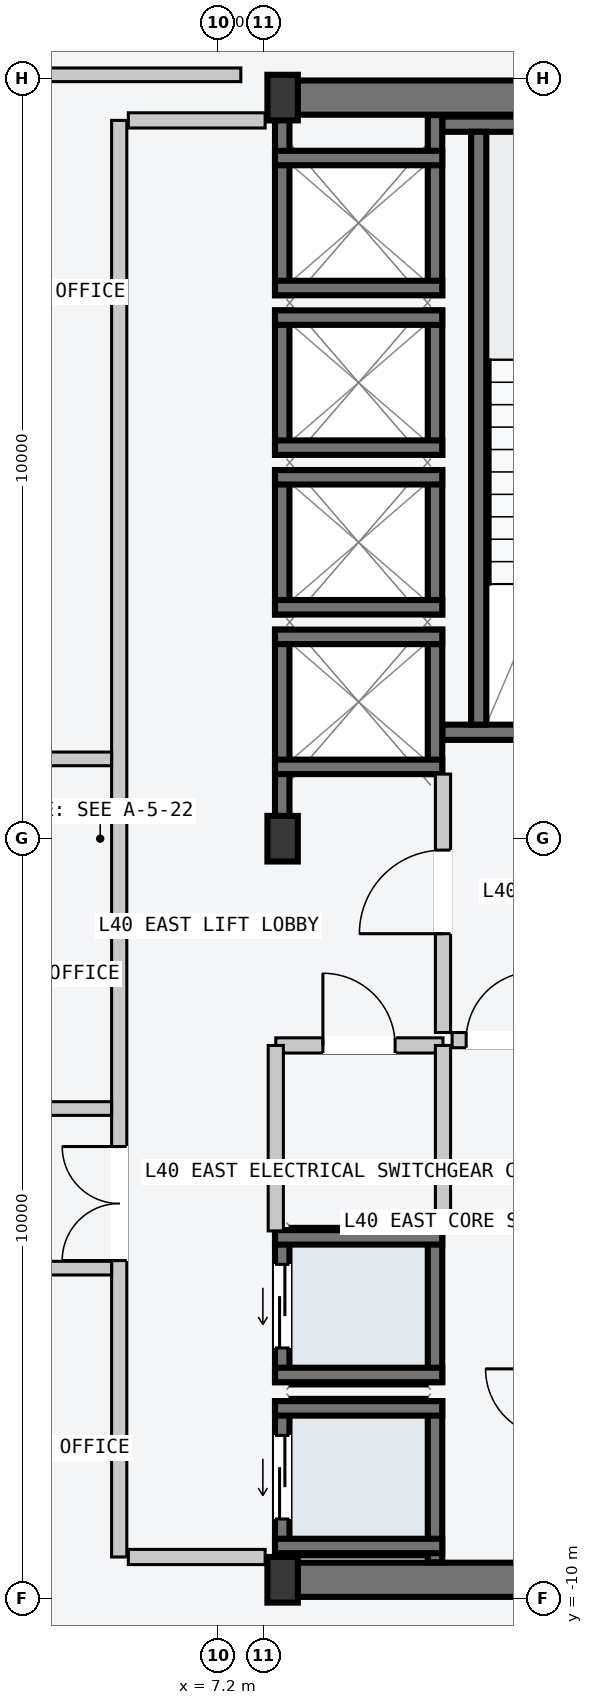
"""IFC4 building model, lengths in metres.
Left out: names, types, materials, properties, quantities, classifications, styles, units other than length and angle.
Written with IfcOpenShell. Run it as: python <this file> out.ifc"""

import sys

from ifc_helpers import new_model, si_unit, direction, frame, frame_2d, origin, origin_2d, place, context, subcontext, project, spatial, rectangle, i_section, extrude, element, fill, save


model = new_model("IFC4")
c1 = context("Model", 3, precision=1e-05, world=origin(), true_north=direction((0.0, 1.0)))
c2 = subcontext(c1, "Body", "Model", "MODEL_VIEW")
j1 = project(units=[si_unit("LENGTHUNIT", "METRE"), si_unit("PLANEANGLEUNIT", "RADIAN")], contexts=[c1])
p1 = place(None, origin())
s1 = spatial("IfcSite", under=j1, at=p1, CompositionType="ELEMENT")
p2 = place(p1, origin())
s2 = spatial("IfcBuilding", under=s1, at=p2, CompositionType="ELEMENT")
p3 = place(p2, frame((0.0, 0.0, 155.1)))
s3 = spatial("IfcBuildingStorey", under=s2, at=p3, CompositionType="ELEMENT", Elevation=155.1)
for number, where, z_axis, x_axis in (
    (1, (8.07, -9.75, -0.2), (0.0, 0.0, 1.0), (1.0, 0.0, 0.0)),
    (2, (8.07, 9.75, -0.2), (0.0, 0.0, 1.0), (1.0, 0.0, 0.0)),
):
    element("IfcWall", number, at=place(p3, frame(where, z_axis=z_axis, x_axis=x_axis)), inside=s3, PredefinedType="SHEAR", context=c2, shape_type="SweptSolid", body=[
        extrude(rectangle(XDim=6.46, YDim=0.45, at=frame_2d((3.23, 0.0))), origin(), (0.0, 0.0, 1.0), 3.6),
    ])
p4 = place(p3, frame((10.15, 1.4, -0.2), z_axis=(0.0, 0.0, 1.0), x_axis=(1.0, 0.0, 0.0)))
e3 = element("IfcWall", 3, at=p4, inside=s3, PredefinedType="SOLIDWALL", context=c2, shape_type="SweptSolid", body=[
    extrude(rectangle(XDim=4.1, YDim=0.2, at=frame_2d((2.05, 0.0))), origin(), (0.0, 0.0, 1.0), 3.6),
])
p5 = place(p4, frame((1.5, 0.0, 0.2)))
e4 = element("IfcOpeningElement", 4, at=p5, cuts=e3, PredefinedType="OPENING", context=c2, shape_type="SweptSolid", body=[
    extrude(rectangle(XDim=1.12, YDim=2.18, at=frame_2d((0.56, 1.09))), frame((0.0, 0.11, 0.0), z_axis=(0.0, -1.0, 0.0), x_axis=(1.0, 0.0, 0.0)), (0.0, 0.0, 1.0), 0.22),
])
p6 = place(p3, frame((10.15, 9.4, -0.2), z_axis=(0.0, 0.0, 1.0), x_axis=(1.0, 0.0, 0.0)))
e5 = element("IfcWall", 5, at=p6, inside=s3, PredefinedType="SOLIDWALL", context=c2, shape_type="SweptSolid", body=[
    extrude(rectangle(XDim=4.1, YDim=0.2, at=frame_2d((2.05, 0.0))), origin(), (0.0, 0.0, 1.0), 3.6),
])
p7 = place(p3, frame((10.63, 1.5, -0.2), z_axis=(0.0, 0.0, 1.0), x_axis=(0.0, 1.0, 0.0)))
e6 = element("IfcWall", 6, at=p7, inside=s3, PredefinedType="SOLIDWALL", context=c2, shape_type="SweptSolid", body=[
    extrude(rectangle(XDim=7.8, YDim=0.2, at=frame_2d((3.9, 0.0))), origin(), (0.0, 0.0, 1.0), 3.6),
])
for number, where, z_axis, x_axis in (
    (7, (8.05, -9.75, 0.0), (0.0, 0.0, 1.0), (1.0, 0.0, 0.0)),
    (8, (8.05, 0.0, 0.0), (0.0, 0.0, 1.0), (1.0, 0.0, 0.0)),
    (9, (8.05, 9.75, 0.0), (0.0, 0.0, 1.0), (1.0, 0.0, 0.0)),
):
    element("IfcColumn", number, at=place(p3, frame(where, z_axis=z_axis, x_axis=x_axis)), inside=s3, PredefinedType="COLUMN", context=c2, shape_type="SweptSolid", body=[
        extrude(i_section(OverallWidth=0.4, OverallDepth=0.6, WebThickness=0.022, FlangeThickness=0.036, at=origin_2d()), origin(), (0.0, 0.0, 1.0), 3.6),
    ])
p8 = place(p3, frame((8.045, 0.21, -0.2), z_axis=(0.0, 0.0, 1.0), x_axis=(0.0, 1.0, 0.0)))
e10 = element("IfcWall", 10, at=p8, inside=s3, PredefinedType="SOLIDWALL", context=c2, shape_type="SweptSolid", body=[
    extrude(rectangle(XDim=2.54, YDim=0.19, at=frame_2d((1.27, 0.0))), origin(), (0.0, 0.0, 1.0), 3.6),
])
p9 = place(p3, frame((10.055, 0.85, -0.2), z_axis=(0.0, 0.0, 1.0), x_axis=(0.0, 1.0, 0.0)))
e11 = element("IfcWall", 11, at=p9, inside=s3, PredefinedType="SOLIDWALL", context=c2, shape_type="SweptSolid", body=[
    extrude(rectangle(XDim=1.9, YDim=0.19, at=frame_2d((0.95, 0.0))), origin(), (0.0, 0.0, 1.0), 3.6),
])
for number, where, z_axis, x_axis in (
    (12, (7.95, 2.655, -0.2), (0.0, 0.0, 1.0), (1.0, 0.0, 0.0)),
    (13, (7.95, 0.945, -0.2), (0.0, 0.0, 1.0), (1.0, 0.0, 0.0)),
):
    element("IfcWall", number, at=place(p3, frame(where, z_axis=z_axis, x_axis=x_axis)), inside=s3, PredefinedType="SOLIDWALL", context=c2, shape_type="SweptSolid", body=[
        extrude(rectangle(XDim=2.2, YDim=0.19, at=frame_2d((1.1, 0.0))), origin(), (0.0, 0.0, 1.0), 3.6),
    ])
for number, where, z_axis, x_axis in (
    (14, (8.045, 2.95, -0.2), (0.0, 0.0, 1.0), (0.0, 1.0, 0.0)),
    (15, (10.055, 2.95, -0.2), (0.0, 0.0, 1.0), (0.0, 1.0, 0.0)),
):
    element("IfcWall", number, at=place(p3, frame(where, z_axis=z_axis, x_axis=x_axis)), inside=s3, PredefinedType="SOLIDWALL", context=c2, shape_type="SweptSolid", body=[
        extrude(rectangle(XDim=1.9, YDim=0.19, at=frame_2d((0.95, 0.0))), origin(), (0.0, 0.0, 1.0), 3.6),
    ])
for number, where, z_axis, x_axis in (
    (16, (7.95, 4.755, -0.2), (0.0, 0.0, 1.0), (1.0, 0.0, 0.0)),
    (17, (7.95, 3.045, -0.2), (0.0, 0.0, 1.0), (1.0, 0.0, 0.0)),
):
    element("IfcWall", number, at=place(p3, frame(where, z_axis=z_axis, x_axis=x_axis)), inside=s3, PredefinedType="SOLIDWALL", context=c2, shape_type="SweptSolid", body=[
        extrude(rectangle(XDim=2.2, YDim=0.19, at=frame_2d((1.1, 0.0))), origin(), (0.0, 0.0, 1.0), 3.6),
    ])
for number, where, z_axis, x_axis in (
    (18, (8.045, 5.05, -0.2), (0.0, 0.0, 1.0), (0.0, 1.0, 0.0)),
    (19, (10.055, 5.05, -0.2), (0.0, 0.0, 1.0), (0.0, 1.0, 0.0)),
):
    element("IfcWall", number, at=place(p3, frame(where, z_axis=z_axis, x_axis=x_axis)), inside=s3, PredefinedType="SOLIDWALL", context=c2, shape_type="SweptSolid", body=[
        extrude(rectangle(XDim=1.9, YDim=0.19, at=frame_2d((0.95, 0.0))), origin(), (0.0, 0.0, 1.0), 3.6),
    ])
for number, where, z_axis, x_axis in (
    (20, (7.95, 6.855, -0.2), (0.0, 0.0, 1.0), (1.0, 0.0, 0.0)),
    (21, (7.95, 5.145, -0.2), (0.0, 0.0, 1.0), (1.0, 0.0, 0.0)),
):
    element("IfcWall", number, at=place(p3, frame(where, z_axis=z_axis, x_axis=x_axis)), inside=s3, PredefinedType="SOLIDWALL", context=c2, shape_type="SweptSolid", body=[
        extrude(rectangle(XDim=2.2, YDim=0.19, at=frame_2d((1.1, 0.0))), origin(), (0.0, 0.0, 1.0), 3.6),
    ])
for number, where, z_axis, x_axis in (
    (22, (8.045, 7.15, -0.2), (0.0, 0.0, 1.0), (0.0, 1.0, 0.0)),
    (23, (10.055, 7.15, -0.2), (0.0, 0.0, 1.0), (0.0, 1.0, 0.0)),
):
    element("IfcWall", number, at=place(p3, frame(where, z_axis=z_axis, x_axis=x_axis)), inside=s3, PredefinedType="SOLIDWALL", context=c2, shape_type="SweptSolid", body=[
        extrude(rectangle(XDim=2.37, YDim=0.19, at=frame_2d((1.185, 0.0))), origin(), (0.0, 0.0, 1.0), 3.6),
    ])
for number, where, z_axis, x_axis in (
    (24, (7.95, 8.955, -0.2), (0.0, 0.0, 1.0), (1.0, 0.0, 0.0)),
    (25, (7.95, 7.245, -0.2), (0.0, 0.0, 1.0), (1.0, 0.0, 0.0)),
):
    element("IfcWall", number, at=place(p3, frame(where, z_axis=z_axis, x_axis=x_axis)), inside=s3, PredefinedType="SOLIDWALL", context=c2, shape_type="SweptSolid", body=[
        extrude(rectangle(XDim=2.2, YDim=0.19, at=frame_2d((1.1, 0.0))), origin(), (0.0, 0.0, 1.0), 3.6),
    ])
p10 = place(p3, frame((8.045, -9.52, -0.2), z_axis=(0.0, 0.0, 1.0), x_axis=(0.0, 1.0, 0.0)))
e26 = element("IfcWall", 26, at=p10, inside=s3, PredefinedType="SOLIDWALL", context=c2, shape_type="SweptSolid", body=[
    extrude(rectangle(XDim=2.12, YDim=0.19, at=frame_2d((1.06, 0.0))), origin(), (0.0, 0.0, 1.0), 3.6),
])
p11 = place(p10, frame((0.57, 0.0, 0.2)))
e27 = element("IfcOpeningElement", 27, at=p11, cuts=e26, PredefinedType="OPENING", context=c2, shape_type="SweptSolid", body=[
    extrude(rectangle(XDim=1.1, YDim=2.2, at=frame_2d((0.55, 1.1))), frame((0.0, 0.105, 0.0), z_axis=(0.0, -1.0, 0.0), x_axis=(1.0, 0.0, 0.0)), (0.0, 0.0, 1.0), 0.21),
])
p12 = place(p3, frame((10.055, -9.52, -0.2), z_axis=(0.0, 0.0, 1.0), x_axis=(0.0, 1.0, 0.0)))
e28 = element("IfcWall", 28, at=p12, inside=s3, PredefinedType="SOLIDWALL", context=c2, shape_type="SweptSolid", body=[
    extrude(rectangle(XDim=2.12, YDim=0.19, at=frame_2d((1.06, 0.0))), origin(), (0.0, 0.0, 1.0), 3.6),
])
for number, where, z_axis, x_axis in (
    (29, (7.95, -7.495, -0.2), (0.0, 0.0, 1.0), (1.0, 0.0, 0.0)),
    (30, (7.95, -9.305, -0.2), (0.0, 0.0, 1.0), (1.0, 0.0, 0.0)),
):
    element("IfcWall", number, at=place(p3, frame(where, z_axis=z_axis, x_axis=x_axis)), inside=s3, PredefinedType="SOLIDWALL", context=c2, shape_type="SweptSolid", body=[
        extrude(rectangle(XDim=2.2, YDim=0.19, at=frame_2d((1.1, 0.0))), origin(), (0.0, 0.0, 1.0), 3.6),
    ])
p13 = place(p3, frame((8.045, -7.15, -0.2), z_axis=(0.0, 0.0, 1.0), x_axis=(0.0, 1.0, 0.0)))
e31 = element("IfcWall", 31, at=p13, inside=s3, PredefinedType="SOLIDWALL", context=c2, shape_type="SweptSolid", body=[
    extrude(rectangle(XDim=2.0, YDim=0.19, at=frame_2d((1.0, 0.0))), origin(), (0.0, 0.0, 1.0), 3.6),
])
p14 = place(p13, frame((0.45, 0.0, 0.2)))
e32 = element("IfcOpeningElement", 32, at=p14, cuts=e31, PredefinedType="OPENING", context=c2, shape_type="SweptSolid", body=[
    extrude(rectangle(XDim=1.1, YDim=2.2, at=frame_2d((0.55, 1.1))), frame((0.0, 0.105, 0.0), z_axis=(0.0, -1.0, 0.0), x_axis=(1.0, 0.0, 0.0)), (0.0, 0.0, 1.0), 0.21),
])
p15 = place(p3, frame((10.055, -7.15, -0.2), z_axis=(0.0, 0.0, 1.0), x_axis=(0.0, 1.0, 0.0)))
e33 = element("IfcWall", 33, at=p15, inside=s3, PredefinedType="SOLIDWALL", context=c2, shape_type="SweptSolid", body=[
    extrude(rectangle(XDim=2.0, YDim=0.19, at=frame_2d((1.0, 0.0))), origin(), (0.0, 0.0, 1.0), 3.6),
])
for number, where, z_axis, x_axis in (
    (34, (7.95, -5.245, -0.2), (0.0, 0.0, 1.0), (1.0, 0.0, 0.0)),
    (35, (7.95, -7.055, -0.2), (0.0, 0.0, 1.0), (1.0, 0.0, 0.0)),
):
    element("IfcWall", number, at=place(p3, frame(where, z_axis=z_axis, x_axis=x_axis)), inside=s3, PredefinedType="SOLIDWALL", context=c2, shape_type="SweptSolid", body=[
        extrude(rectangle(XDim=2.2, YDim=0.19, at=frame_2d((1.1, 0.0))), origin(), (0.0, 0.0, 1.0), 3.6),
    ])
p16 = place(p3, frame((5.9, -9.45, 0.0), z_axis=(0.0, 0.0, 1.0), x_axis=(0.0, 1.0, 0.0)))
e36 = element("IfcWall", 36, at=p16, inside=s3, PredefinedType="PARTITIONING", context=c2, shape_type="SweptSolid", body=[
    extrude(rectangle(XDim=18.9, YDim=0.2, at=frame_2d((9.45, 0.0))), origin(), (0.0, 0.0, 1.0), 3.4),
])
p17 = place(p16, frame((3.9, 0.0, 0.0)))
e37 = element("IfcOpeningElement", 37, at=p17, cuts=e36, PredefinedType="OPENING", context=c2, shape_type="SweptSolid", body=[
    extrude(rectangle(XDim=1.5, YDim=2.2, at=frame_2d((0.75, 1.1))), frame((0.0, 0.11, 0.0), z_axis=(0.0, -1.0, 0.0), x_axis=(1.0, 0.0, 0.0)), (0.0, 0.0, 1.0), 0.22),
])
for number, where, z_axis, x_axis in (
    (38, (6.02, -9.45, 0.0), (0.0, 0.0, 1.0), (1.0, 0.0, 0.0)),
    (39, (6.02, 9.45, 0.0), (0.0, 0.0, 1.0), (1.0, 0.0, 0.0)),
):
    element("IfcWall", number, at=place(p3, frame(where, z_axis=z_axis, x_axis=x_axis)), inside=s3, PredefinedType="PARTITIONING", context=c2, shape_type="SweptSolid", body=[
        extrude(rectangle(XDim=1.8, YDim=0.2, at=frame_2d((0.9, 0.0))), origin(), (0.0, 0.0, 1.0), 3.4),
    ])
p18 = place(p3, frame((10.16, -2.55, 0.0), z_axis=(0.0, 0.0, 1.0), x_axis=(0.0, 1.0, 0.0)))
e40 = element("IfcWall", 40, at=p18, inside=s3, PredefinedType="PARTITIONING", context=c2, shape_type="SweptSolid", body=[
    extrude(rectangle(XDim=3.4, YDim=0.2, at=frame_2d((1.7, 0.0))), origin(), (0.0, 0.0, 1.0), 3.4),
])
p19 = place(p18, frame((1.3, 0.0, 0.0)))
e41 = element("IfcOpeningElement", 41, at=p19, cuts=e40, PredefinedType="OPENING", context=c2, shape_type="SweptSolid", body=[
    extrude(rectangle(XDim=1.1, YDim=2.15, at=frame_2d((0.55, 1.075))), frame((0.0, 0.11, 0.0), z_axis=(0.0, -1.0, 0.0), x_axis=(1.0, 0.0, 0.0)), (0.0, 0.0, 1.0), 0.22),
])
p20 = place(p3, frame((10.28, -2.65, 0.0), z_axis=(0.0, 0.0, 1.0), x_axis=(1.0, 0.0, 0.0)))
e42 = element("IfcWall", 42, at=p20, inside=s3, PredefinedType="PARTITIONING", context=c2, shape_type="SweptSolid", body=[
    extrude(rectangle(XDim=1.27, YDim=0.2, at=frame_2d((0.635, 0.0))), origin(), (0.0, 0.0, 1.0), 3.4),
])
p21 = place(p20, frame((0.185, 0.0, 0.0)))
e43 = element("IfcOpeningElement", 43, at=p21, cuts=e42, PredefinedType="OPENING", context=c2, shape_type="SweptSolid", body=[
    extrude(rectangle(XDim=0.9, YDim=2.15, at=frame_2d((0.45, 1.075))), frame((0.0, 0.11, 0.0), z_axis=(0.0, -1.0, 0.0), x_axis=(1.0, 0.0, 0.0)), (0.0, 0.0, 1.0), 0.22),
])
p22 = place(p3, frame((7.96, -2.72, 0.0), z_axis=(0.0, 0.0, 1.0), x_axis=(1.0, 0.0, 0.0)))
e44 = element("IfcWall", 44, at=p22, inside=s3, PredefinedType="PARTITIONING", context=c2, shape_type="SweptSolid", body=[
    extrude(rectangle(XDim=2.2, YDim=0.2, at=frame_2d((1.1, 0.0))), origin(), (0.0, 0.0, 1.0), 3.4),
])
p23 = place(p22, frame((0.62, 0.0, 0.0)))
e45 = element("IfcOpeningElement", 45, at=p23, cuts=e44, PredefinedType="OPENING", context=c2, shape_type="SweptSolid", body=[
    extrude(rectangle(XDim=0.95, YDim=2.1, at=frame_2d((0.475, 1.05))), frame((0.0, 0.11, 0.0), z_axis=(0.0, -1.0, 0.0), x_axis=(1.0, 0.0, 0.0)), (0.0, 0.0, 1.0), 0.22),
])
for number, where, z_axis, x_axis in (
    (46, (7.96, -5.16, 0.0), (0.0, 0.0, 1.0), (0.0, 1.0, 0.0)),
    (47, (10.16, -5.16, 0.0), (0.0, 0.0, 1.0), (0.0, 1.0, 0.0)),
):
    element("IfcWall", number, at=place(p3, frame(where, z_axis=z_axis, x_axis=x_axis)), inside=s3, PredefinedType="PARTITIONING", context=c2, shape_type="SweptSolid", body=[
        extrude(rectangle(XDim=2.44, YDim=0.2, at=frame_2d((1.22, 0.0))), origin(), (0.0, 0.0, 1.0), 3.4),
    ])
p24 = place(p3, frame((1.26, 1.05, 0.0), z_axis=(0.0, 0.0, 1.0), x_axis=(1.0, 0.0, 0.0)))
e48 = element("IfcWall", 48, at=p24, inside=s3, PredefinedType="PARTITIONING", context=c2, shape_type="SweptSolid", body=[
    extrude(rectangle(XDim=4.54, YDim=0.18, at=frame_2d((2.27, 0.0))), origin(), (0.0, 0.0, 1.0), 3.4),
])
p25 = place(p3, frame((1.26, 10.05, 0.0), z_axis=(0.0, 0.0, 1.0), x_axis=(1.0, 0.0, 0.0)))
e49 = element("IfcWall", 49, at=p25, inside=s3, PredefinedType="PARTITIONING", context=c2, shape_type="SweptSolid", body=[
    extrude(rectangle(XDim=6.24, YDim=0.18, at=frame_2d((3.12, 0.0))), origin(), (0.0, 0.0, 1.0), 3.4),
])
for number, where, z_axis, x_axis in (
    (50, (1.26, -3.55, 0.0), (0.0, 0.0, 1.0), (1.0, 0.0, 0.0)),
    (51, (1.26, -5.65, 0.0), (0.0, 0.0, 1.0), (1.0, 0.0, 0.0)),
):
    element("IfcWall", number, at=place(p3, frame(where, z_axis=z_axis, x_axis=x_axis)), inside=s3, PredefinedType="PARTITIONING", context=c2, shape_type="SweptSolid", body=[
        extrude(rectangle(XDim=4.54, YDim=0.18, at=frame_2d((2.27, 0.0))), origin(), (0.0, 0.0, 1.0), 3.4),
    ])
p26 = place(p11, origin())
e52 = element("IfcDoor", 52, at=p26, inside=s3, OperationType="SLIDING_TO_LEFT", PredefinedType="DOOR", context=c2, shape_type="SweptSolid", body=[
    extrude(rectangle(XDim=1.1, YDim=2.2, at=frame_2d((0.55, 1.1))), frame((0.0, 0.025, 0.0), z_axis=(0.0, -1.0, 0.0), x_axis=(1.0, 0.0, 0.0)), (0.0, 0.0, 1.0), 0.05),
])
fill(e27, e52)
p27 = place(p14, origin())
e53 = element("IfcDoor", 53, at=p27, inside=s3, OperationType="SLIDING_TO_LEFT", PredefinedType="DOOR", context=c2, shape_type="SweptSolid", body=[
    extrude(rectangle(XDim=1.1, YDim=2.2, at=frame_2d((0.55, 1.1))), frame((0.0, 0.025, 0.0), z_axis=(0.0, -1.0, 0.0), x_axis=(1.0, 0.0, 0.0)), (0.0, 0.0, 1.0), 0.05),
])
fill(e32, e53)
p28 = place(p17, origin())
e54 = element("IfcDoor", 54, at=p28, inside=s3, OperationType="DOUBLE_DOOR_SINGLE_SWING", PredefinedType="DOOR", context=c2, shape_type="SweptSolid", body=[
    extrude(rectangle(XDim=1.5, YDim=2.2, at=frame_2d((0.75, 1.1))), frame((0.0, 0.025, 0.0), z_axis=(0.0, -1.0, 0.0), x_axis=(1.0, 0.0, 0.0)), (0.0, 0.0, 1.0), 0.05),
])
fill(e37, e54)
p29 = place(p19, origin())
e55 = element("IfcDoor", 55, at=p29, inside=s3, OperationType="SINGLE_SWING_LEFT", PredefinedType="DOOR", context=c2, shape_type="SweptSolid", body=[
    extrude(rectangle(XDim=1.1, YDim=2.15, at=frame_2d((0.55, 1.075))), frame((0.0, 0.025, 0.0), z_axis=(0.0, -1.0, 0.0), x_axis=(1.0, 0.0, 0.0)), (0.0, 0.0, 1.0), 0.05),
])
fill(e41, e55)
p30 = place(p21, origin())
e56 = element("IfcDoor", 56, at=p30, inside=s3, OperationType="SINGLE_SWING_RIGHT", PredefinedType="DOOR", context=c2, shape_type="SweptSolid", body=[
    extrude(rectangle(XDim=0.9, YDim=2.15, at=frame_2d((0.45, 1.075))), frame((0.0, 0.025, 0.0), z_axis=(0.0, -1.0, 0.0), x_axis=(1.0, 0.0, 0.0)), (0.0, 0.0, 1.0), 0.05),
])
fill(e43, e56)
p31 = place(p23, origin())
e57 = element("IfcDoor", 57, at=p31, inside=s3, OperationType="SINGLE_SWING_LEFT", PredefinedType="DOOR", context=c2, shape_type="SweptSolid", body=[
    extrude(rectangle(XDim=0.95, YDim=2.1, at=frame_2d((0.475, 1.05))), frame((0.0, 0.025, 0.0), z_axis=(0.0, -1.0, 0.0), x_axis=(1.0, 0.0, 0.0)), (0.0, 0.0, 1.0), 0.05),
])
fill(e45, e57)
save(model, sys.argv[1])
